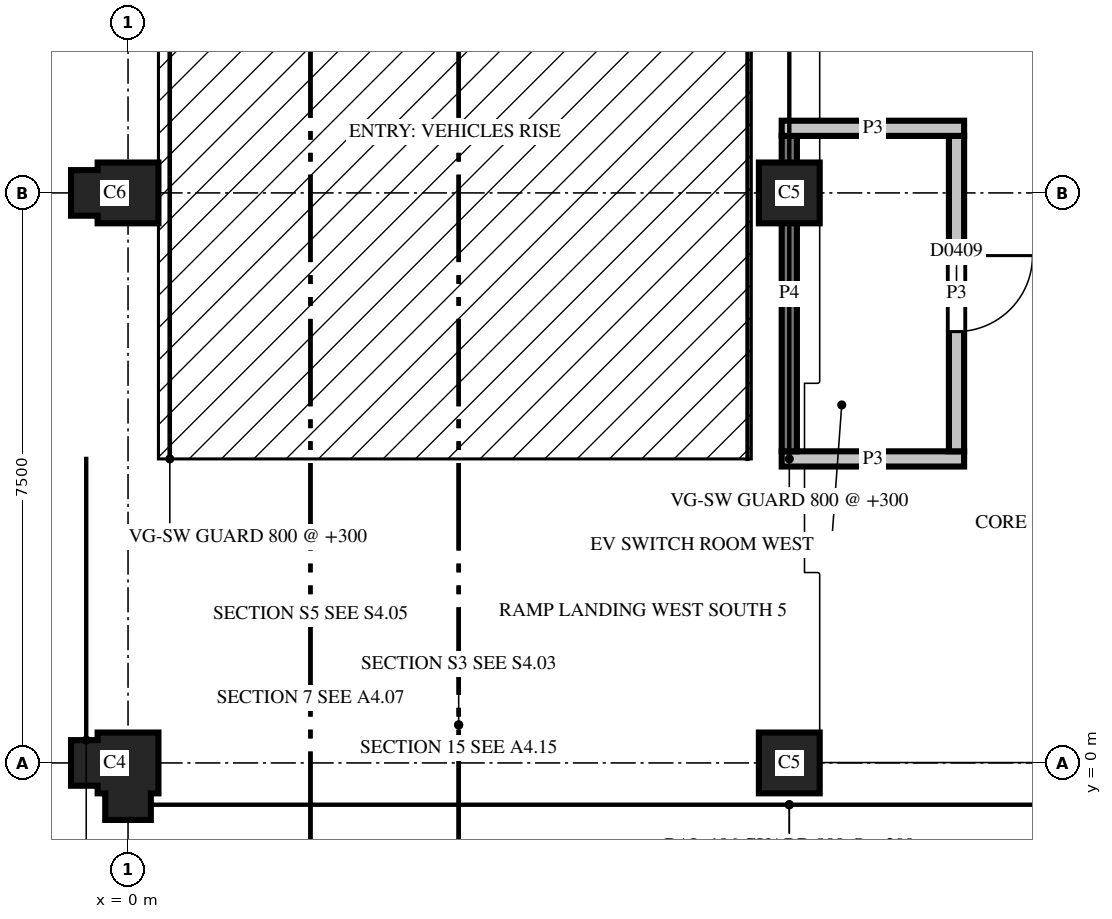
"""IFC4 building model, lengths in metres.
Left out: names, types, materials, properties, quantities, classifications, styles, units other than length and angle.
Written with IfcOpenShell. Run it as: python <this file> out.ifc"""

import sys

from ifc_helpers import new_model, si_unit, direction, frame, frame_2d, origin, place, context, subcontext, project, spatial, polyline, rectangle, outline, extrude, element, fill, save


model = new_model("IFC4")
c1 = context("Model", 3, precision=1e-05, world=origin(), true_north=direction((0.0, 1.0)))
c2 = subcontext(c1, "Body", "Model", "MODEL_VIEW")
j1 = project(units=[si_unit("LENGTHUNIT", "METRE"), si_unit("PLANEANGLEUNIT", "RADIAN")], contexts=[c1])
p1 = place(None, origin())
s1 = spatial("IfcSite", under=j1, at=p1, CompositionType="ELEMENT")
p2 = place(p1, origin())
s2 = spatial("IfcBuilding", under=s1, at=p2, CompositionType="ELEMENT")
p3 = place(p2, frame((0.0, 0.0, 15.6)))
s3 = spatial("IfcBuildingStorey", under=s2, at=p3, CompositionType="ELEMENT", Elevation=15.6)
p4 = place(p3, frame((0.0, 0.0, 0.0), z_axis=(0.0, 0.0, 1.0), x_axis=(-1.0, 0.0, 0.0)))
e1 = element("IfcColumn", 1, at=p4, inside=s3, PredefinedType="COLUMN", context=c2, shape_type="SweptSolid", body=[
    extrude(outline(polyline([(-0.4, -0.4), (0.4, -0.4), (0.4, -0.3), (0.75, -0.3), (0.75, 0.3), (0.4, 0.3), (0.4, 0.4), (0.3, 0.4), (0.3, 0.75), (-0.3, 0.75), (-0.3, 0.4), (-0.4, 0.4), (-0.4, -0.4)])), origin(), (0.0, 0.0, 1.0), 3.7),
])
p5 = place(p3, frame((8.7, 0.0, 0.0), z_axis=(0.0, 0.0, 1.0), x_axis=(1.0, 0.0, 0.0)))
e2 = element("IfcColumn", 2, at=p5, inside=s3, PredefinedType="COLUMN", context=c2, shape_type="SweptSolid", body=[
    extrude(outline(polyline([(-0.4, -0.4), (0.4, -0.4), (0.4, 0.4), (-0.4, 0.4), (-0.4, -0.4)])), origin(), (0.0, 0.0, 1.0), 3.7),
])
p6 = place(p3, frame((0.0, 7.5, 0.0), z_axis=(0.0, 0.0, 1.0), x_axis=(-1.0, 0.0, 0.0)))
e3 = element("IfcColumn", 3, at=p6, inside=s3, PredefinedType="COLUMN", context=c2, shape_type="SweptSolid", body=[
    extrude(outline(polyline([(-0.4, -0.4), (0.4, -0.4), (0.4, -0.3), (0.75, -0.3), (0.75, 0.3), (0.4, 0.3), (0.4, 0.4), (-0.4, 0.4), (-0.4, -0.4)])), origin(), (0.0, 0.0, 1.0), 3.7),
])
p7 = place(p3, frame((8.7, 7.5, 0.0), z_axis=(0.0, 0.0, 1.0), x_axis=(1.0, 0.0, 0.0)))
e4 = element("IfcColumn", 4, at=p7, inside=s3, PredefinedType="COLUMN", context=c2, shape_type="SweptSolid", body=[
    extrude(outline(polyline([(-0.4, -0.4), (0.4, -0.4), (0.4, 0.4), (-0.4, 0.4), (-0.4, -0.4)])), origin(), (0.0, 0.0, 1.0), 3.7),
])
p8 = place(p3, frame((8.6, 4.0, 0.0), z_axis=(0.0, 0.0, 1.0), x_axis=(1.0, 0.0, 0.0)))
e5 = element("IfcWall", 5, at=p8, inside=s3, PredefinedType="PARTITIONING", context=c2, shape_type="SweptSolid", body=[
    extrude(rectangle(XDim=2.4, YDim=0.2, at=frame_2d((1.2, 0.0))), origin(), (0.0, 0.0, 1.0), 2.88),
])
p9 = place(p3, frame((10.9, 4.1, 0.0), z_axis=(0.0, 0.0, 1.0), x_axis=(0.0, 1.0, 0.0)))
e6 = element("IfcWall", 6, at=p9, inside=s3, PredefinedType="PARTITIONING", context=c2, shape_type="SweptSolid", body=[
    extrude(rectangle(XDim=4.15, YDim=0.2, at=frame_2d((2.075, 0.0))), origin(), (0.0, 0.0, 1.0), 2.88),
])
p10 = place(p9, frame((1.575, 0.0, 0.0)))
e7 = element("IfcOpeningElement", 7, at=p10, cuts=e6, PredefinedType="OPENING", context=c2, shape_type="SweptSolid", body=[
    extrude(rectangle(XDim=1.0, YDim=2.1, at=frame_2d((0.5, 1.05))), frame((0.0, 0.11, 0.0), z_axis=(0.0, -1.0, 0.0), x_axis=(1.0, 0.0, 0.0)), (0.0, 0.0, 1.0), 0.22),
])
p11 = place(p3, frame((8.7, 8.25, 0.0), z_axis=(0.0, 0.0, 1.0), x_axis=(0.0, -1.0, 0.0)))
e8 = element("IfcWall", 8, at=p11, inside=s3, PredefinedType="PARTITIONING", context=c2, shape_type="SweptSolid", body=[
    extrude(rectangle(XDim=4.15, YDim=0.2, at=frame_2d((2.075, 0.0))), origin(), (0.0, 0.0, 1.0), 2.6),
])
p12 = place(p3, frame((11.0, 8.35, 0.0), z_axis=(0.0, 0.0, 1.0), x_axis=(-1.0, 0.0, 0.0)))
e9 = element("IfcWall", 9, at=p12, inside=s3, PredefinedType="PARTITIONING", context=c2, shape_type="SweptSolid", body=[
    extrude(rectangle(XDim=2.4, YDim=0.2, at=frame_2d((1.2, 0.0))), origin(), (0.0, 0.0, 1.0), 2.88),
])
p13 = place(p10, origin())
e10 = element("IfcDoor", 10, at=p13, inside=s3, OperationType="SINGLE_SWING_RIGHT", PredefinedType="DOOR", context=c2, shape_type="SweptSolid", body=[
    extrude(rectangle(XDim=1.0, YDim=2.1, at=frame_2d((0.5, 1.05))), frame((0.0, 0.025, 0.0), z_axis=(0.0, -1.0, 0.0), x_axis=(1.0, 0.0, 0.0)), (0.0, 0.0, 1.0), 0.05),
])
fill(e7, e10)
save(model, sys.argv[1])
